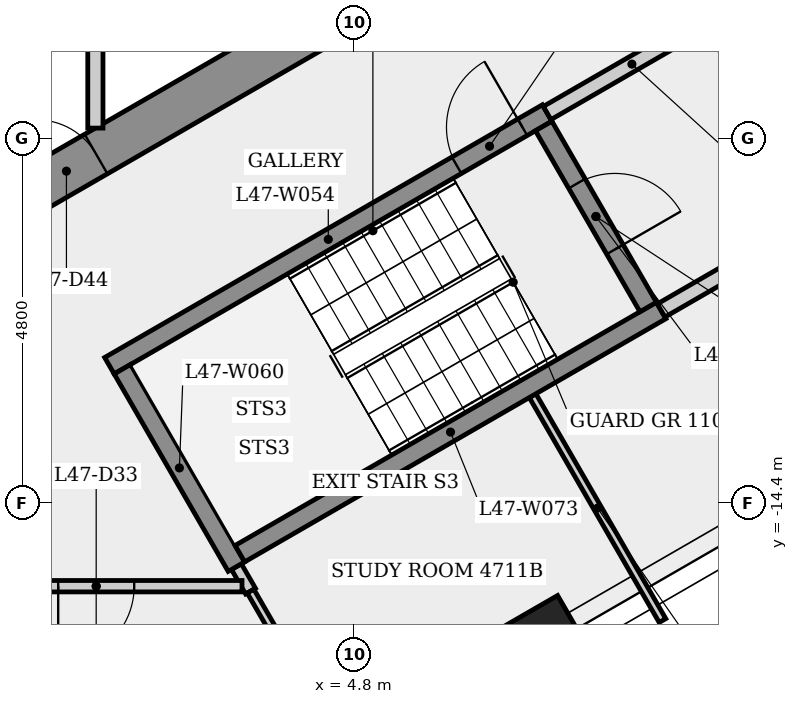
"""IFC4 building model, lengths in metres.
Left out: names, types, materials, properties, quantities, classifications, styles, units other than length and angle.
Written with IfcOpenShell. Run it as: python <this file> out.ifc"""

import sys

from ifc_helpers import new_model, si_unit, direction, frame, frame_2d, origin, origin_2d, place, context, subcontext, project, spatial, rectangle, extrude, element, fill, save


model = new_model("IFC4")
c1 = context("Model", 3, precision=1e-05, world=origin(), true_north=direction((0.0, 1.0)))
c2 = subcontext(c1, "Body", "Model", "MODEL_VIEW")
j1 = project(units=[si_unit("LENGTHUNIT", "METRE"), si_unit("PLANEANGLEUNIT", "RADIAN")], contexts=[c1])
p1 = place(None, origin())
s1 = spatial("IfcSite", under=j1, at=p1, CompositionType="ELEMENT")
p2 = place(p1, origin())
s2 = spatial("IfcBuilding", under=s1, at=p2, CompositionType="ELEMENT")
p3 = place(p2, frame((0.0, 0.0, 176.5)))
s3 = spatial("IfcBuildingStorey", under=s2, at=p3, CompositionType="ELEMENT", Elevation=176.5)
p4 = place(p3, frame((-0.15, -10.71, 0.0), z_axis=(0.0, 0.0, 1.0), x_axis=(0.866023993627, 0.500002442456, 0.0)))
e1 = element("IfcWall", 1, at=p4, inside=s3, PredefinedType="SHEAR", context=c2, shape_type="SweptSolid", body=[
    extrude(rectangle(XDim=10.97, YDim=0.6, at=frame_2d((5.485, 0.0))), origin(), (0.0, 0.0, 1.0), 3.4),
])
p5 = place(p4, frame((0.9, 0.0, 0.0)))
e2 = element("IfcOpeningElement", 2, at=p5, cuts=e1, PredefinedType="OPENING", context=c2, shape_type="SweptSolid", body=[
    extrude(rectangle(XDim=0.9, YDim=2.1, at=frame_2d((0.45, 1.05))), frame((0.0, 0.31, 0.0), z_axis=(0.0, -1.0, 0.0), x_axis=(1.0, 0.0, 0.0)), (0.0, 0.0, 1.0), 0.62),
])
p6 = place(p4, frame((7.512, 0.0, 0.0)))
e3 = element("IfcOpeningElement", 3, at=p6, cuts=e1, PredefinedType="OPENING", context=c2, shape_type="SweptSolid", body=[
    extrude(rectangle(XDim=0.9, YDim=2.1, at=frame_2d((0.45, 1.05))), frame((0.0, 0.31, 0.0), z_axis=(0.0, -1.0, 0.0), x_axis=(1.0, 0.0, 0.0)), (0.0, 0.0, 1.0), 0.62),
])
p7 = place(p3, frame((7.308, -16.267, 0.0), z_axis=(0.0, 0.0, 1.0), x_axis=(0.5, -0.866025403784, 0.0)))
e4 = element("IfcColumn", 4, at=p7, inside=s3, PredefinedType="COLUMN", context=c2, shape_type="SweptSolid", body=[
    extrude(rectangle(XDim=0.95, YDim=0.95, at=origin_2d()), origin(), (0.0, 0.0, 1.0), 3.4),
])
p8 = place(p3, frame((1.4, -5.25, 0.0), z_axis=(0.0, 0.0, 1.0), x_axis=(0.0, -1.0, 0.0)))
e5 = element("IfcWall", 5, at=p8, inside=s3, PredefinedType="PARTITIONING", context=c2, shape_type="SweptSolid", body=[
    extrude(rectangle(XDim=4.219, YDim=0.2, at=frame_2d((2.109, 0.0))), origin(), (0.0, 0.0, 1.0), 3.05),
])
p9 = place(p3, frame((1.585, -12.595, 0.0), z_axis=(0.0, 0.0, 1.0), x_axis=(0.866036417653, 0.499980922934, 0.0)))
e6 = element("IfcWall", 6, at=p9, inside=s3, PredefinedType="SHEAR", context=c2, shape_type="SweptSolid", body=[
    extrude(rectangle(XDim=6.65, YDim=0.25, at=frame_2d((3.325, 0.0))), origin(), (0.0, 0.0, 1.0), 3.05),
])
p10 = place(p9, frame((5.275, 0.0, 0.0)))
e7 = element("IfcOpeningElement", 7, at=p10, cuts=e6, PredefinedType="OPENING", context=c2, shape_type="SweptSolid", body=[
    extrude(rectangle(XDim=1.0, YDim=2.1, at=frame_2d((0.5, 1.05))), frame((0.0, 0.135, 0.0), z_axis=(0.0, -1.0, 0.0), x_axis=(1.0, 0.0, 0.0)), (0.0, 0.0, 1.0), 0.27),
])
p11 = place(p3, frame((3.256, -15.239, 0.0), z_axis=(0.0, 0.0, 1.0), x_axis=(0.499949632511, -0.866054481515, 0.0)))
e8 = element("IfcWall", 8, at=p11, inside=s3, PredefinedType="PARTITIONING", context=c2, shape_type="SweptSolid", body=[
    extrude(rectangle(XDim=0.372, YDim=0.15, at=frame_2d((0.186, 0.0))), origin(), (0.0, 0.0, 1.0), 3.05),
])
p12 = place(p3, frame((3.256, -15.239, 0.0), z_axis=(0.0, 0.0, 1.0), x_axis=(-0.50002537861, 0.866010750942, 0.0)))
e9 = element("IfcWall", 9, at=p12, inside=s3, PredefinedType="SHEAR", context=c2, shape_type="SweptSolid", body=[
    extrude(rectangle(XDim=3.0, YDim=0.25, at=frame_2d((1.5, 0.0))), origin(), (0.0, 0.0, 1.0), 3.05),
])
p13 = place(p3, frame((3.329, -15.496, 0.0), z_axis=(0.0, 0.0, 1.0), x_axis=(-1.0, 0.0, 0.0)))
e10 = element("IfcWall", 10, at=p13, inside=s3, PredefinedType="PARTITIONING", context=c2, shape_type="SweptSolid", body=[
    extrude(rectangle(XDim=3.837, YDim=0.15, at=frame_2d((1.918, 0.0))), origin(), (0.0, 0.0, 1.0), 3.05),
])
p14 = place(p13, frame((1.418, 0.0, 0.0)))
e11 = element("IfcOpeningElement", 11, at=p14, cuts=e10, PredefinedType="OPENING", context=c2, shape_type="SweptSolid", body=[
    extrude(rectangle(XDim=1.0, YDim=2.1, at=frame_2d((0.5, 1.05))), frame((0.0, 0.085, 0.0), z_axis=(0.0, -1.0, 0.0), x_axis=(1.0, 0.0, 0.0)), (0.0, 0.0, 1.0), 0.17),
])
p15 = place(p3, frame((3.442, -15.561, 0.0), z_axis=(0.0, 0.0, 1.0), x_axis=(0.500002389912, -0.866024023964, 0.0)))
e12 = element("IfcWall", 12, at=p15, inside=s3, PredefinedType="PARTITIONING", context=c2, shape_type="SweptSolid", body=[
    extrude(rectangle(XDim=3.045, YDim=0.1, at=frame_2d((1.522, 0.0))), origin(), (0.0, 0.0, 1.0), 3.05),
])
p16 = place(p15, frame((0.837, 0.0, 0.0)))
e13 = element("IfcOpeningElement", 13, at=p16, cuts=e12, PredefinedType="OPENING", context=c2, shape_type="SweptSolid", body=[
    extrude(rectangle(XDim=0.9, YDim=2.1, at=frame_2d((0.45, 1.05))), frame((0.0, 0.06, 0.0), z_axis=(0.0, -1.0, 0.0), x_axis=(1.0, 0.0, 0.0)), (0.0, 0.0, 1.0), 0.12),
])
p17 = place(p3, frame((7.153, -12.989, 0.0), z_axis=(0.0, 0.0, 1.0), x_axis=(0.4999966448, -0.866027340901, 0.0)))
e14 = element("IfcWall", 14, at=p17, inside=s3, PredefinedType="PARTITIONING", context=c2, shape_type="SweptSolid", body=[
    extrude(rectangle(XDim=3.417, YDim=0.1, at=frame_2d((1.708, 0.0))), origin(), (0.0, 0.0, 1.0), 3.05),
])
p18 = place(p3, frame((3.301, -15.068, 0.0), z_axis=(0.0, 0.0, 1.0), x_axis=(0.866035036182, 0.499983315828, 0.0)))
e15 = element("IfcWall", 15, at=p18, inside=s3, PredefinedType="SHEAR", context=c2, shape_type="SweptSolid", body=[
    extrude(rectangle(XDim=6.4, YDim=0.25, at=frame_2d((3.2, 0.0))), origin(), (0.0, 0.0, 1.0), 3.05),
])
p19 = place(p3, frame((7.298, -9.441, 0.0), z_axis=(0.0, 0.0, 1.0), x_axis=(0.500034990121, -0.866005201286, 0.0)))
e16 = element("IfcWall", 16, at=p19, inside=s3, PredefinedType="SHEAR", context=c2, shape_type="SweptSolid", body=[
    extrude(rectangle(XDim=2.75, YDim=0.25, at=frame_2d((1.375, 0.0))), origin(), (0.0, 0.0, 1.0), 3.05),
])
p20 = place(p19, frame((0.875, 0.0, 0.0)))
e17 = element("IfcOpeningElement", 17, at=p20, cuts=e16, PredefinedType="OPENING", context=c2, shape_type="SweptSolid", body=[
    extrude(rectangle(XDim=1.0, YDim=2.1, at=frame_2d((0.5, 1.05))), frame((0.0, 0.135, 0.0), z_axis=(0.0, -1.0, 0.0), x_axis=(1.0, 0.0, 0.0)), (0.0, 0.0, 1.0), 0.27),
])
p21 = place(p3, frame((7.344, -9.27, 0.0), z_axis=(0.0, 0.0, 1.0), x_axis=(0.866005588531, 0.500034319456, 0.0)))
e18 = element("IfcWall", 18, at=p21, inside=s3, PredefinedType="PARTITIONING", context=c2, shape_type="SweptSolid", body=[
    extrude(rectangle(XDim=2.575, YDim=0.2, at=frame_2d((1.288, 0.0))), origin(), (0.0, 0.0, 1.0), 3.05),
])
p22 = place(p3, frame((9.537, -8.119, 0.0), z_axis=(0.0, 0.0, 1.0), x_axis=(0.499990139034, -0.866031096941, 0.0)))
e19 = element("IfcWall", 19, at=p22, inside=s3, PredefinedType="PARTITIONING", context=c2, shape_type="SweptSolid", body=[
    extrude(rectangle(XDim=3.0, YDim=0.2, at=frame_2d((1.5, 0.0))), origin(), (0.0, 0.0, 1.0), 3.05),
])
p23 = place(p22, frame((0.935, 0.0, 0.0)))
e20 = element("IfcOpeningElement", 20, at=p23, cuts=e19, PredefinedType="OPENING", context=c2, shape_type="SweptSolid", body=[
    extrude(rectangle(XDim=1.0, YDim=2.1, at=frame_2d((0.5, 1.05))), frame((0.0, 0.11, 0.0), z_axis=(0.0, -1.0, 0.0), x_axis=(1.0, 0.0, 0.0)), (0.0, 0.0, 1.0), 0.22),
])
p24 = place(p3, frame((10.901, -10.681, 0.0), z_axis=(0.0, 0.0, 1.0), x_axis=(-0.866007538022, -0.500030943131, 0.0)))
e21 = element("IfcWall", 21, at=p24, inside=s3, PredefinedType="PARTITIONING", context=c2, shape_type="SweptSolid", body=[
    extrude(rectangle(XDim=2.375, YDim=0.2, at=frame_2d((1.188, 0.0))), origin(), (0.0, 0.0, 1.0), 3.05),
])
p25 = place(p10, origin())
e22 = element("IfcDoor", 22, at=p25, inside=s3, OperationType="SINGLE_SWING_RIGHT", PredefinedType="DOOR", context=c2, shape_type="SweptSolid", body=[
    extrude(rectangle(XDim=1.0, YDim=2.1, at=frame_2d((0.5, 1.05))), frame((0.0, 0.025, 0.0), z_axis=(0.0, -1.0, 0.0), x_axis=(1.0, 0.0, 0.0)), (0.0, 0.0, 1.0), 0.05),
])
fill(e7, e22)
p26 = place(p20, origin())
e23 = element("IfcDoor", 23, at=p26, inside=s3, OperationType="SINGLE_SWING_RIGHT", PredefinedType="DOOR", context=c2, shape_type="SweptSolid", body=[
    extrude(rectangle(XDim=1.0, YDim=2.1, at=frame_2d((0.5, 1.05))), frame((0.0, 0.025, 0.0), z_axis=(0.0, -1.0, 0.0), x_axis=(1.0, 0.0, 0.0)), (0.0, 0.0, 1.0), 0.05),
])
fill(e17, e23)
p27 = place(p14, origin())
e24 = element("IfcDoor", 24, at=p27, inside=s3, OperationType="SINGLE_SWING_RIGHT", PredefinedType="DOOR", context=c2, shape_type="SweptSolid", body=[
    extrude(rectangle(XDim=1.0, YDim=2.1, at=frame_2d((0.5, 1.05))), frame((0.0, 0.025, 0.0), z_axis=(0.0, -1.0, 0.0), x_axis=(1.0, 0.0, 0.0)), (0.0, 0.0, 1.0), 0.05),
])
fill(e11, e24)
p28 = place(p5, origin())
e25 = element("IfcDoor", 25, at=p28, inside=s3, OperationType="SINGLE_SWING_LEFT", PredefinedType="DOOR", context=c2, shape_type="SweptSolid", body=[
    extrude(rectangle(XDim=0.9, YDim=2.1, at=frame_2d((0.45, 1.05))), frame((0.0, 0.025, 0.0), z_axis=(0.0, -1.0, 0.0), x_axis=(1.0, 0.0, 0.0)), (0.0, 0.0, 1.0), 0.05),
])
fill(e2, e25)
save(model, sys.argv[1])
